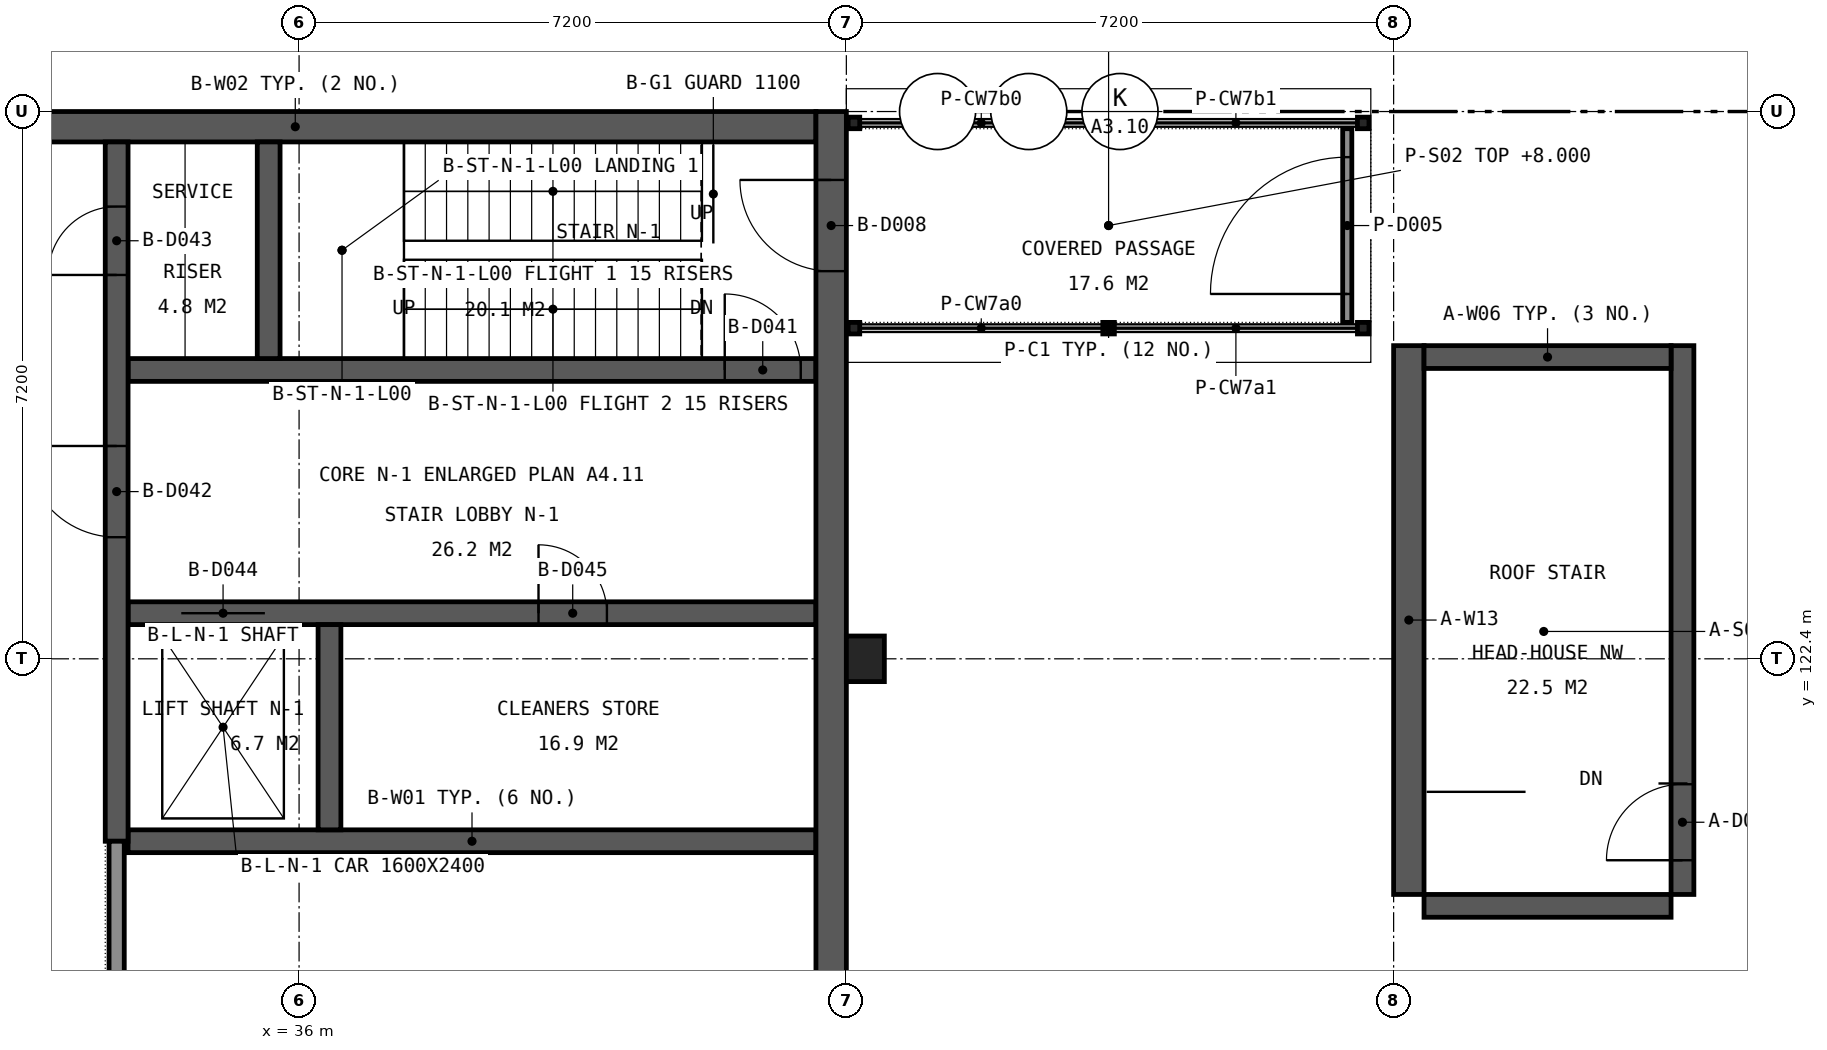
"""IFC4 building model, lengths in metres.
Left out: names, types, materials, properties, quantities, classifications, styles, units other than length and angle.
Written with IfcOpenShell. Run it as: python <this file> out.ifc"""

import sys

from ifc_helpers import new_model, si_unit, direction, frame, frame_2d, origin, origin_2d, place, context, subcontext, project, spatial, rectangle, hollow_rectangle, extrude, element, fill, save


model = new_model("IFC4")
c1 = context("Model", 3, precision=1e-05, world=origin(), true_north=direction((0.0, 1.0)))
c2 = subcontext(c1, "Body", "Model", "MODEL_VIEW")
j1 = project(units=[si_unit("LENGTHUNIT", "METRE"), si_unit("PLANEANGLEUNIT", "RADIAN")], contexts=[c1])
p1 = place(None, origin())
s1 = spatial("IfcSite", under=j1, at=p1, CompositionType="ELEMENT")
p2 = place(p1, origin())
s2 = spatial("IfcBuilding", under=s1, at=p2, CompositionType="ELEMENT")
p3 = place(p2, frame((0.0, 0.0, 4.8)))
s3 = spatial("IfcBuildingStorey", under=s2, at=p3, CompositionType="ELEMENT", Elevation=4.8)
p4 = place(p3, frame((50.6, 119.3, 0.0), z_axis=(0.0, 0.0, 1.0), x_axis=(0.0, 1.0, 0.0)))
e1 = element("IfcWall", 1, at=p4, inside=s3, PredefinedType="SHEAR", context=c2, shape_type="SweptSolid", body=[
    extrude(rectangle(XDim=7.22, YDim=0.4, at=frame_2d((3.61, 0.0))), origin(), (0.0, 0.0, 1.0), 2.5),
])
p5 = place(p3, frame((54.2, 119.3, 0.0), z_axis=(0.0, 0.0, 1.0), x_axis=(0.0, 1.0, 0.0)))
e2 = element("IfcWall", 2, at=p5, inside=s3, PredefinedType="SHEAR", context=c2, shape_type="SweptSolid", body=[
    extrude(rectangle(XDim=7.22, YDim=0.3, at=frame_2d((3.61, 0.0))), origin(), (0.0, 0.0, 1.0), 2.5),
])
p6 = place(p5, frame((0.45, 0.0, 0.0)))
e3 = element("IfcOpeningElement", 3, at=p6, cuts=e2, PredefinedType="OPENING", context=c2, shape_type="SweptSolid", body=[
    extrude(rectangle(XDim=1.0, YDim=2.1, at=frame_2d((0.5, 1.05))), frame((0.0, 0.16, 0.0), z_axis=(0.0, -1.0, 0.0), x_axis=(1.0, 0.0, 0.0)), (0.0, 0.0, 1.0), 0.32),
])
for number, where, z_axis, x_axis in (
    (4, (50.8, 126.37, 0.0), (0.0, 0.0, 1.0), (1.0, 0.0, 0.0)),
    (5, (50.8, 119.15, 0.0), (0.0, 0.0, 1.0), (1.0, 0.0, 0.0)),
):
    element("IfcWall", number, at=place(p3, frame(where, z_axis=z_axis, x_axis=x_axis)), inside=s3, PredefinedType="SHEAR", context=c2, shape_type="SweptSolid", body=[
        extrude(rectangle(XDim=3.25, YDim=0.3, at=frame_2d((1.625, 0.0))), origin(), (0.0, 0.0, 1.0), 2.5),
    ])
p7 = place(p3, frame((33.75, 120.0, 0.0), z_axis=(0.0, 0.0, 1.0), x_axis=(1.0, 0.0, 0.0)))
e6 = element("IfcWall", 6, at=p7, inside=s3, PredefinedType="SHEAR", context=c2, shape_type="SweptSolid", body=[
    extrude(rectangle(XDim=9.05, YDim=0.3, at=frame_2d((4.525, 0.0))), origin(), (0.0, 0.0, 1.0), 4.55),
])
p8 = place(p3, frame((33.75, 123.0, 0.0), z_axis=(0.0, 0.0, 1.0), x_axis=(1.0, 0.0, 0.0)))
e7 = element("IfcWall", 7, at=p8, inside=s3, PredefinedType="SHEAR", context=c2, shape_type="SweptSolid", body=[
    extrude(rectangle(XDim=9.05, YDim=0.3, at=frame_2d((4.525, 0.0))), origin(), (0.0, 0.0, 1.0), 4.55),
])
p9 = place(p8, frame((0.7, 0.0, 0.0)))
e8 = element("IfcOpeningElement", 8, at=p9, cuts=e7, PredefinedType="OPENING", context=c2, shape_type="SweptSolid", body=[
    extrude(rectangle(XDim=1.1, YDim=2.1, at=frame_2d((0.55, 1.05))), frame((0.0, 0.16, 0.0), z_axis=(0.0, -1.0, 0.0), x_axis=(1.0, 0.0, 0.0)), (0.0, 0.0, 1.0), 0.32),
])
p10 = place(p8, frame((5.4, 0.0, 0.0)))
e9 = element("IfcOpeningElement", 9, at=p10, cuts=e7, PredefinedType="OPENING", context=c2, shape_type="SweptSolid", body=[
    extrude(rectangle(XDim=0.9, YDim=2.1, at=frame_2d((0.45, 1.05))), frame((0.0, 0.16, 0.0), z_axis=(0.0, -1.0, 0.0), x_axis=(1.0, 0.0, 0.0)), (0.0, 0.0, 1.0), 0.32),
])
p11 = place(p3, frame((33.75, 126.2, 0.0), z_axis=(0.0, 0.0, 1.0), x_axis=(1.0, 0.0, 0.0)))
e10 = element("IfcWall", 10, at=p11, inside=s3, PredefinedType="SHEAR", context=c2, shape_type="SweptSolid", body=[
    extrude(rectangle(XDim=9.05, YDim=0.3, at=frame_2d((4.525, 0.0))), origin(), (0.0, 0.0, 1.0), 4.55),
])
p12 = place(p11, frame((7.85, 0.0, 0.0)))
e11 = element("IfcOpeningElement", 11, at=p12, cuts=e10, PredefinedType="OPENING", context=c2, shape_type="SweptSolid", body=[
    extrude(rectangle(XDim=1.0, YDim=2.1, at=frame_2d((0.5, 1.05))), frame((0.0, 0.16, 0.0), z_axis=(0.0, -1.0, 0.0), x_axis=(1.0, 0.0, 0.0)), (0.0, 0.0, 1.0), 0.32),
])
p13 = place(p3, frame((29.1, 129.4, 0.0), z_axis=(0.0, 0.0, 1.0), x_axis=(1.0, 0.0, 0.0)))
e12 = element("IfcWall", 12, at=p13, inside=s3, PredefinedType="SHEAR", context=c2, shape_type="SweptSolid", body=[
    extrude(rectangle(XDim=13.7, YDim=0.4, at=frame_2d((6.85, 0.0))), origin(), (0.0, 0.0, 1.0), 4.55),
])
p14 = place(p3, frame((33.6, 120.0, 0.0), z_axis=(0.0, 0.0, 1.0), x_axis=(0.0, 1.0, 0.0)))
e13 = element("IfcWall", 13, at=p14, inside=s3, PredefinedType="SHEAR", context=c2, shape_type="SweptSolid", body=[
    extrude(rectangle(XDim=9.2, YDim=0.3, at=frame_2d((4.6, 0.0))), origin(), (0.0, 0.0, 1.0), 4.55),
])
p15 = place(p14, frame((4.0, 0.0, 0.0)))
e14 = element("IfcOpeningElement", 14, at=p15, cuts=e13, PredefinedType="OPENING", context=c2, shape_type="SweptSolid", body=[
    extrude(rectangle(XDim=1.2, YDim=2.1, at=frame_2d((0.6, 1.05))), frame((0.0, 0.16, 0.0), z_axis=(0.0, -1.0, 0.0), x_axis=(1.0, 0.0, 0.0)), (0.0, 0.0, 1.0), 0.32),
])
p16 = place(p14, frame((7.45, 0.0, 0.0)))
e15 = element("IfcOpeningElement", 15, at=p16, cuts=e13, PredefinedType="OPENING", context=c2, shape_type="SweptSolid", body=[
    extrude(rectangle(XDim=0.9, YDim=2.1, at=frame_2d((0.45, 1.05))), frame((0.0, 0.16, 0.0), z_axis=(0.0, -1.0, 0.0), x_axis=(1.0, 0.0, 0.0)), (0.0, 0.0, 1.0), 0.32),
])
p17 = place(p3, frame((35.6, 126.35, 0.0), z_axis=(0.0, 0.0, 1.0), x_axis=(0.0, 1.0, 0.0)))
e16 = element("IfcWall", 16, at=p17, inside=s3, PredefinedType="SHEAR", context=c2, shape_type="SweptSolid", body=[
    extrude(rectangle(XDim=2.85, YDim=0.3, at=frame_2d((1.425, 0.0))), origin(), (0.0, 0.0, 1.0), 4.55),
])
p18 = place(p3, frame((36.4, 120.15, 0.0), z_axis=(0.0, 0.0, 1.0), x_axis=(0.0, 1.0, 0.0)))
e17 = element("IfcWall", 17, at=p18, inside=s3, PredefinedType="SHEAR", context=c2, shape_type="SweptSolid", body=[
    extrude(rectangle(XDim=2.7, YDim=0.3, at=frame_2d((1.35, 0.0))), origin(), (0.0, 0.0, 1.0), 4.55),
])
p19 = place(p3, frame((43.0, 115.5, 0.0), z_axis=(0.0, 0.0, 1.0), x_axis=(0.0, 1.0, 0.0)))
e18 = element("IfcWall", 18, at=p19, inside=s3, PredefinedType="SHEAR", context=c2, shape_type="SweptSolid", body=[
    extrude(rectangle(XDim=14.1, YDim=0.4, at=frame_2d((7.05, 0.0))), origin(), (0.0, 0.0, 1.0), 4.55),
])
p20 = place(p19, frame((12.0, 0.0, 0.0)))
e19 = element("IfcOpeningElement", 19, at=p20, cuts=e18, PredefinedType="OPENING", context=c2, shape_type="SweptSolid", body=[
    extrude(rectangle(XDim=1.2, YDim=2.1, at=frame_2d((0.6, 1.05))), frame((0.0, 0.21, 0.0), z_axis=(0.0, -1.0, 0.0), x_axis=(1.0, 0.0, 0.0)), (0.0, 0.0, 1.0), 0.42),
])
for number, where, z_axis, x_axis in (
    (20, (43.3, 126.75, 0.0), (0.0, 0.0, 1.0), (1.0, 0.0, 0.0)),
    (21, (46.65, 126.75, 0.0), (0.0, 0.0, 1.0), (1.0, 0.0, 0.0)),
    (22, (50.0, 126.75, 0.0), (0.0, 0.0, 1.0), (1.0, 0.0, 0.0)),
    (23, (43.3, 129.45, 0.0), (0.0, 0.0, 1.0), (1.0, 0.0, 0.0)),
    (24, (46.65, 129.45, 0.0), (0.0, 0.0, 1.0), (1.0, 0.0, 0.0)),
    (25, (50.0, 129.45, 0.0), (0.0, 0.0, 1.0), (1.0, 0.0, 0.0)),
):
    element("IfcColumn", number, at=place(p3, frame(where, z_axis=z_axis, x_axis=x_axis)), inside=s3, PredefinedType="COLUMN", context=c2, shape_type="SweptSolid", body=[
        extrude(hollow_rectangle(XDim=0.152, YDim=0.152, WallThickness=0.01, at=origin_2d()), origin(), (0.0, 0.0, 1.0), 2.753),
    ])
p21 = place(p3, frame((43.45, 122.4, 0.0), z_axis=(0.0, 0.0, 1.0), x_axis=(1.0, 0.0, 0.0)))
e26 = element("IfcColumn", 26, at=p21, inside=s3, PredefinedType="COLUMN", context=c2, shape_type="SweptSolid", body=[
    extrude(rectangle(XDim=0.5, YDim=0.6, at=origin_2d()), origin(), (0.0, 0.0, 1.0), 4.8),
])
p22 = place(p3, frame((49.79, 126.826, 0.0), z_axis=(0.0, 0.0, 1.0), x_axis=(0.0, 1.0, 0.0)))
e27 = element("IfcWall", 27, at=p22, inside=s3, PredefinedType="SOLIDWALL", context=c2, shape_type="SweptSolid", body=[
    extrude(rectangle(XDim=2.548, YDim=0.12, at=frame_2d((1.274, 0.0))), origin(), (0.0, 0.0, 1.0), 2.753),
])
p23 = place(p22, frame((0.374, 0.0, 0.0)))
e28 = element("IfcOpeningElement", 28, at=p23, cuts=e27, PredefinedType="OPENING", context=c2, shape_type="SweptSolid", body=[
    extrude(rectangle(XDim=1.8, YDim=2.4, at=frame_2d((0.9, 1.2))), frame((0.0, 0.07, 0.0), z_axis=(0.0, -1.0, 0.0), x_axis=(1.0, 0.0, 0.0)), (0.0, 0.0, 1.0), 0.14),
])
p24 = place(p3, frame((33.6, 96.0, 0.0), z_axis=(0.0, 0.0, 1.0), x_axis=(0.0, 1.0, 0.0)))
e29 = element("IfcWall", 29, at=p24, inside=s3, PredefinedType="PARTITIONING", context=c2, shape_type="SweptSolid", body=[
    extrude(rectangle(XDim=24.0, YDim=0.2, at=frame_2d((12.0, 0.0))), origin(), (0.0, 0.0, 1.0), 3.95),
])
p25 = place(p24, frame((17.1, 0.0, 0.0)))
e30 = element("IfcOpeningElement", 30, at=p25, cuts=e29, PredefinedType="OPENING", context=c2, shape_type="SweptSolid", body=[
    extrude(rectangle(XDim=1.8, YDim=2.1, at=frame_2d((0.9, 1.05))), frame((0.0, 0.11, 0.0), z_axis=(0.0, -1.0, 0.0), x_axis=(1.0, 0.0, 0.0)), (0.0, 0.0, 1.0), 0.22),
])
p26 = place(p24, frame((9.7, 0.0, 0.0)))
e31 = element("IfcOpeningElement", 31, at=p26, cuts=e29, PredefinedType="OPENING", context=c2, shape_type="SweptSolid", body=[
    extrude(rectangle(XDim=1.0, YDim=2.1, at=frame_2d((0.5, 1.05))), frame((0.0, 0.11, 0.0), z_axis=(0.0, -1.0, 0.0), x_axis=(1.0, 0.0, 0.0)), (0.0, 0.0, 1.0), 0.22),
])
p27 = place(p24, frame((3.3, 0.0, 0.0)))
e32 = element("IfcOpeningElement", 32, at=p27, cuts=e29, PredefinedType="OPENING", context=c2, shape_type="SweptSolid", body=[
    extrude(rectangle(XDim=1.8, YDim=2.1, at=frame_2d((0.9, 1.05))), frame((0.0, 0.11, 0.0), z_axis=(0.0, -1.0, 0.0), x_axis=(1.0, 0.0, 0.0)), (0.0, 0.0, 1.0), 0.22),
])
p28 = place(p20, origin())
e33 = element("IfcDoor", 33, at=p28, inside=s3, OperationType="SINGLE_SWING_RIGHT", PredefinedType="DOOR", context=c2, shape_type="SweptSolid", body=[
    extrude(rectangle(XDim=1.2, YDim=2.1, at=frame_2d((0.6, 1.05))), frame((0.0, 0.025, 0.0), z_axis=(0.0, -1.0, 0.0), x_axis=(1.0, 0.0, 0.0)), (0.0, 0.0, 1.0), 0.05),
])
fill(e19, e33)
p29 = place(p23, origin())
e34 = element("IfcDoor", 34, at=p29, inside=s3, OperationType="DOUBLE_DOOR_DOUBLE_SWING", PredefinedType="DOOR", context=c2, shape_type="SweptSolid", body=[
    extrude(rectangle(XDim=1.8, YDim=2.4, at=frame_2d((0.9, 1.2))), frame((0.0, 0.025, 0.0), z_axis=(0.0, -1.0, 0.0), x_axis=(1.0, 0.0, 0.0)), (0.0, 0.0, 1.0), 0.05),
])
fill(e28, e34)
p30 = place(p6, origin())
e35 = element("IfcDoor", 35, at=p30, inside=s3, OperationType="SINGLE_SWING_LEFT", PredefinedType="DOOR", context=c2, shape_type="SweptSolid", body=[
    extrude(rectangle(XDim=1.0, YDim=2.1, at=frame_2d((0.5, 1.05))), frame((0.0, 0.025, 0.0), z_axis=(0.0, -1.0, 0.0), x_axis=(1.0, 0.0, 0.0)), (0.0, 0.0, 1.0), 0.05),
])
fill(e3, e35)
p31 = place(p12, origin())
e36 = element("IfcDoor", 36, at=p31, inside=s3, OperationType="SINGLE_SWING_LEFT", PredefinedType="DOOR", context=c2, shape_type="SweptSolid", body=[
    extrude(rectangle(XDim=1.0, YDim=2.1, at=frame_2d((0.5, 1.05))), frame((0.0, 0.025, 0.0), z_axis=(0.0, -1.0, 0.0), x_axis=(1.0, 0.0, 0.0)), (0.0, 0.0, 1.0), 0.05),
])
fill(e11, e36)
p32 = place(p15, origin())
e37 = element("IfcDoor", 37, at=p32, inside=s3, OperationType="SINGLE_SWING_RIGHT", PredefinedType="DOOR", context=c2, shape_type="SweptSolid", body=[
    extrude(rectangle(XDim=1.2, YDim=2.1, at=frame_2d((0.6, 1.05))), frame((0.0, 0.025, 0.0), z_axis=(0.0, -1.0, 0.0), x_axis=(1.0, 0.0, 0.0)), (0.0, 0.0, 1.0), 0.05),
])
fill(e14, e37)
p33 = place(p16, origin())
e38 = element("IfcDoor", 38, at=p33, inside=s3, OperationType="SINGLE_SWING_LEFT", PredefinedType="DOOR", context=c2, shape_type="SweptSolid", body=[
    extrude(rectangle(XDim=0.9, YDim=2.1, at=frame_2d((0.45, 1.05))), frame((0.0, 0.025, 0.0), z_axis=(0.0, -1.0, 0.0), x_axis=(1.0, 0.0, 0.0)), (0.0, 0.0, 1.0), 0.05),
])
fill(e15, e38)
p34 = place(p9, origin())
e39 = element("IfcDoor", 39, at=p34, inside=s3, OperationType="SLIDING_TO_LEFT", PredefinedType="DOOR", context=c2, shape_type="SweptSolid", body=[
    extrude(rectangle(XDim=1.1, YDim=2.1, at=frame_2d((0.55, 1.05))), frame((0.0, 0.025, 0.0), z_axis=(0.0, -1.0, 0.0), x_axis=(1.0, 0.0, 0.0)), (0.0, 0.0, 1.0), 0.05),
])
fill(e8, e39)
p35 = place(p10, origin())
e40 = element("IfcDoor", 40, at=p35, inside=s3, OperationType="SINGLE_SWING_LEFT", PredefinedType="DOOR", context=c2, shape_type="SweptSolid", body=[
    extrude(rectangle(XDim=0.9, YDim=2.1, at=frame_2d((0.45, 1.05))), frame((0.0, 0.025, 0.0), z_axis=(0.0, -1.0, 0.0), x_axis=(1.0, 0.0, 0.0)), (0.0, 0.0, 1.0), 0.05),
])
fill(e9, e40)
save(model, sys.argv[1])
